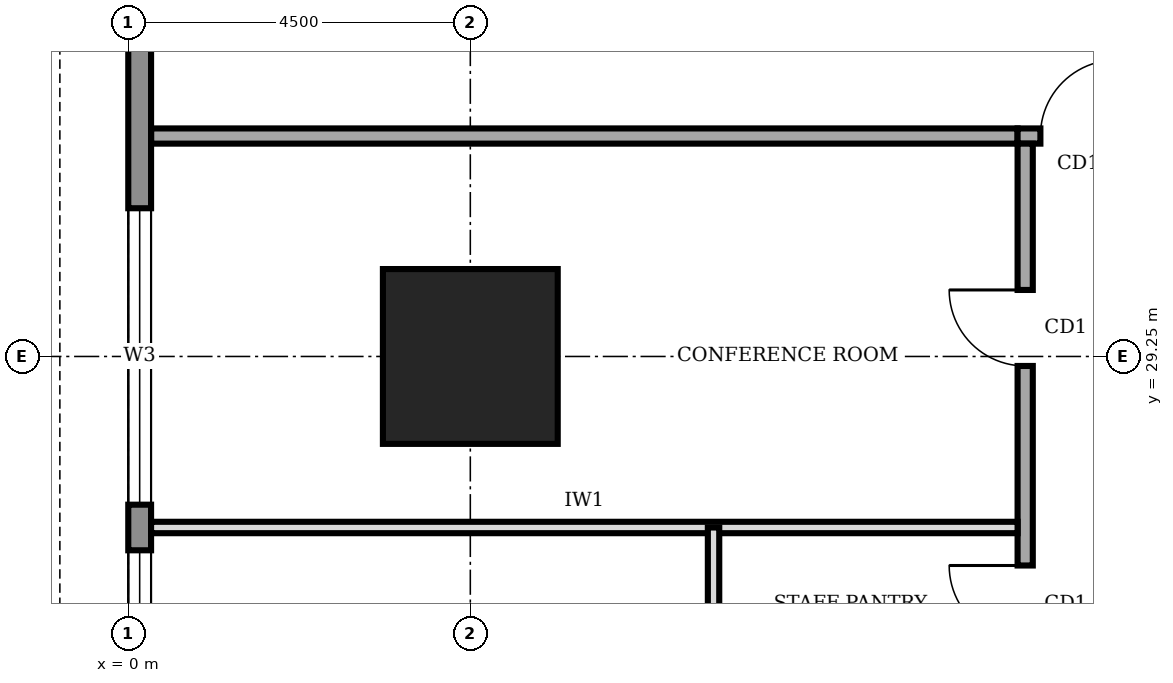
"""IFC4 building model, lengths in metres.
Left out: names, types, materials, properties, quantities, classifications, styles, units other than length and angle.
Written with IfcOpenShell. Run it as: python <this file> out.ifc"""

import sys

from ifc_helpers import new_model, si_unit, direction, frame, frame_2d, origin, origin_2d, place, context, subcontext, project, spatial, rectangle, extrude, element, fill, save


model = new_model("IFC4")
c1 = context("Model", 3, precision=1e-05, world=origin(), true_north=direction((0.0, 1.0)))
c2 = subcontext(c1, "Body", "Model", "MODEL_VIEW")
j1 = project(units=[si_unit("LENGTHUNIT", "METRE"), si_unit("PLANEANGLEUNIT", "RADIAN")], contexts=[c1])
p1 = place(None, origin())
s1 = spatial("IfcSite", under=j1, at=p1, CompositionType="ELEMENT")
p2 = place(p1, origin())
s2 = spatial("IfcBuilding", under=s1, at=p2, CompositionType="ELEMENT")
p3 = place(p2, frame((0.0, 0.0, 101.0)))
s3 = spatial("IfcBuildingStorey", under=s2, at=p3, CompositionType="ELEMENT", Elevation=101.0)
p4 = place(p3, frame((4.5, 29.25, 0.0), z_axis=(0.0, 0.0, 1.0), x_axis=(1.0, 0.0, 0.0)))
e1 = element("IfcColumn", 1, at=p4, inside=s3, PredefinedType="COLUMN", context=c2, shape_type="SweptSolid", body=[
    extrude(rectangle(XDim=2.3, YDim=2.3, at=origin_2d()), origin(), (0.0, 0.0, 1.0), 4.0),
])
p5 = place(p3, frame((0.15, 35.98, 0.0), z_axis=(0.0, 0.0, 1.0), x_axis=(0.0, -1.0, 0.0)))
e2 = element("IfcWall", 2, at=p5, inside=s3, PredefinedType="STANDARD", context=c2, shape_type="SweptSolid", body=[
    extrude(rectangle(XDim=31.46, YDim=0.3, at=frame_2d((15.73, 0.0))), origin(), (0.0, 0.0, 1.0), 3.75),
])
p6 = place(p5, frame((27.28, 0.0, 0.95)))
e3 = element("IfcOpeningElement", 3, at=p6, cuts=e2, PredefinedType="OPENING", context=c2, shape_type="SweptSolid", body=[
    extrude(rectangle(XDim=3.9, YDim=1.8, at=frame_2d((1.95, 0.9))), frame((0.0, 0.16, 0.0), z_axis=(0.0, -1.0, 0.0), x_axis=(1.0, 0.0, 0.0)), (0.0, 0.0, 1.0), 0.32),
])
p7 = place(p5, frame((22.78, 0.0, 0.95)))
e4 = element("IfcOpeningElement", 4, at=p7, cuts=e2, PredefinedType="OPENING", context=c2, shape_type="SweptSolid", body=[
    extrude(rectangle(XDim=3.9, YDim=1.8, at=frame_2d((1.95, 0.9))), frame((0.0, 0.16, 0.0), z_axis=(0.0, -1.0, 0.0), x_axis=(1.0, 0.0, 0.0)), (0.0, 0.0, 1.0), 0.32),
])
p8 = place(p5, frame((18.28, 0.0, 0.95)))
e5 = element("IfcOpeningElement", 5, at=p8, cuts=e2, PredefinedType="OPENING", context=c2, shape_type="SweptSolid", body=[
    extrude(rectangle(XDim=3.9, YDim=1.8, at=frame_2d((1.95, 0.9))), frame((0.0, 0.16, 0.0), z_axis=(0.0, -1.0, 0.0), x_axis=(1.0, 0.0, 0.0)), (0.0, 0.0, 1.0), 0.32),
])
p9 = place(p5, frame((13.78, 0.0, 0.95)))
e6 = element("IfcOpeningElement", 6, at=p9, cuts=e2, PredefinedType="OPENING", context=c2, shape_type="SweptSolid", body=[
    extrude(rectangle(XDim=3.9, YDim=1.8, at=frame_2d((1.95, 0.9))), frame((0.0, 0.16, 0.0), z_axis=(0.0, -1.0, 0.0), x_axis=(1.0, 0.0, 0.0)), (0.0, 0.0, 1.0), 0.32),
])
p10 = place(p5, frame((9.28, 0.0, 0.95)))
e7 = element("IfcOpeningElement", 7, at=p10, cuts=e2, PredefinedType="OPENING", context=c2, shape_type="SweptSolid", body=[
    extrude(rectangle(XDim=3.9, YDim=1.8, at=frame_2d((1.95, 0.9))), frame((0.0, 0.16, 0.0), z_axis=(0.0, -1.0, 0.0), x_axis=(1.0, 0.0, 0.0)), (0.0, 0.0, 1.0), 0.32),
])
p11 = place(p5, frame((4.78, 0.0, 0.95)))
e8 = element("IfcOpeningElement", 8, at=p11, cuts=e2, PredefinedType="OPENING", context=c2, shape_type="SweptSolid", body=[
    extrude(rectangle(XDim=3.9, YDim=1.8, at=frame_2d((1.95, 0.9))), frame((0.0, 0.16, 0.0), z_axis=(0.0, -1.0, 0.0), x_axis=(1.0, 0.0, 0.0)), (0.0, 0.0, 1.0), 0.32),
])
p12 = place(p3, frame((40.2, 32.15, 0.0), z_axis=(0.0, 0.0, 1.0), x_axis=(-1.0, 0.0, 0.0)))
e9 = element("IfcWall", 9, at=p12, inside=s3, PredefinedType="SOLIDWALL", context=c2, shape_type="SweptSolid", body=[
    extrude(rectangle(XDim=28.5, YDim=0.2, at=frame_2d((14.25, 0.0))), origin(), (0.0, 0.0, 1.0), 3.75),
])
p13 = place(p12, frame((27.2, 0.0, 0.0)))
e10 = element("IfcOpeningElement", 10, at=p13, cuts=e9, PredefinedType="OPENING", context=c2, shape_type="SweptSolid", body=[
    extrude(rectangle(XDim=1.0, YDim=2.1, at=frame_2d((0.5, 1.05))), frame((0.0, 0.11, 0.0), z_axis=(0.0, -1.0, 0.0), x_axis=(1.0, 0.0, 0.0)), (0.0, 0.0, 1.0), 0.22),
])
p14 = place(p12, frame((23.95, 0.0, 0.0)))
e11 = element("IfcOpeningElement", 11, at=p14, cuts=e9, PredefinedType="OPENING", context=c2, shape_type="SweptSolid", body=[
    extrude(rectangle(XDim=1.0, YDim=2.1, at=frame_2d((0.5, 1.05))), frame((0.0, 0.11, 0.0), z_axis=(0.0, -1.0, 0.0), x_axis=(1.0, 0.0, 0.0)), (0.0, 0.0, 1.0), 0.22),
])
p15 = place(p12, frame((17.2, 0.0, 0.0)))
e12 = element("IfcOpeningElement", 12, at=p15, cuts=e9, PredefinedType="OPENING", context=c2, shape_type="SweptSolid", body=[
    extrude(rectangle(XDim=1.0, YDim=2.1, at=frame_2d((0.5, 1.05))), frame((0.0, 0.11, 0.0), z_axis=(0.0, -1.0, 0.0), x_axis=(1.0, 0.0, 0.0)), (0.0, 0.0, 1.0), 0.22),
])
p16 = place(p12, frame((6.0, 0.0, 0.0)))
e13 = element("IfcOpeningElement", 13, at=p16, cuts=e9, PredefinedType="OPENING", context=c2, shape_type="SweptSolid", body=[
    extrude(rectangle(XDim=1.0, YDim=2.1, at=frame_2d((0.5, 1.05))), frame((0.0, 0.11, 0.0), z_axis=(0.0, -1.0, 0.0), x_axis=(1.0, 0.0, 0.0)), (0.0, 0.0, 1.0), 0.22),
])
p17 = place(p3, frame((11.8, 32.05, 0.0), z_axis=(0.0, 0.0, 1.0), x_axis=(0.0, -1.0, 0.0)))
e14 = element("IfcWall", 14, at=p17, inside=s3, PredefinedType="SOLIDWALL", context=c2, shape_type="SweptSolid", body=[
    extrude(rectangle(XDim=23.8, YDim=0.2, at=frame_2d((11.9, 0.0))), origin(), (0.0, 0.0, 1.0), 3.75),
])
p18 = place(p17, frame((20.675, 0.0, 0.0)))
e15 = element("IfcOpeningElement", 15, at=p18, cuts=e14, PredefinedType="OPENING", context=c2, shape_type="SweptSolid", body=[
    extrude(rectangle(XDim=1.0, YDim=2.1, at=frame_2d((0.5, 1.05))), frame((0.0, 0.11, 0.0), z_axis=(0.0, -1.0, 0.0), x_axis=(1.0, 0.0, 0.0)), (0.0, 0.0, 1.0), 0.22),
])
p19 = place(p17, frame((16.2, 0.0, 0.0)))
e16 = element("IfcOpeningElement", 16, at=p19, cuts=e14, PredefinedType="OPENING", context=c2, shape_type="SweptSolid", body=[
    extrude(rectangle(XDim=0.9, YDim=2.1, at=frame_2d((0.45, 1.05))), frame((0.0, 0.11, 0.0), z_axis=(0.0, -1.0, 0.0), x_axis=(1.0, 0.0, 0.0)), (0.0, 0.0, 1.0), 0.22),
])
p20 = place(p17, frame((13.2, 0.0, 0.0)))
e17 = element("IfcOpeningElement", 17, at=p20, cuts=e14, PredefinedType="OPENING", context=c2, shape_type="SweptSolid", body=[
    extrude(rectangle(XDim=0.9, YDim=2.1, at=frame_2d((0.45, 1.05))), frame((0.0, 0.11, 0.0), z_axis=(0.0, -1.0, 0.0), x_axis=(1.0, 0.0, 0.0)), (0.0, 0.0, 1.0), 0.22),
])
p21 = place(p17, frame((8.35, 0.0, 0.0)))
e18 = element("IfcOpeningElement", 18, at=p21, cuts=e14, PredefinedType="OPENING", context=c2, shape_type="SweptSolid", body=[
    extrude(rectangle(XDim=0.9, YDim=2.1, at=frame_2d((0.45, 1.05))), frame((0.0, 0.11, 0.0), z_axis=(0.0, -1.0, 0.0), x_axis=(1.0, 0.0, 0.0)), (0.0, 0.0, 1.0), 0.22),
])
p22 = place(p17, frame((5.55, 0.0, 0.0)))
e19 = element("IfcOpeningElement", 19, at=p22, cuts=e14, PredefinedType="OPENING", context=c2, shape_type="SweptSolid", body=[
    extrude(rectangle(XDim=1.0, YDim=2.1, at=frame_2d((0.5, 1.05))), frame((0.0, 0.11, 0.0), z_axis=(0.0, -1.0, 0.0), x_axis=(1.0, 0.0, 0.0)), (0.0, 0.0, 1.0), 0.22),
])
p23 = place(p17, frame((11.05, 0.0, 0.0)))
e20 = element("IfcOpeningElement", 20, at=p23, cuts=e14, PredefinedType="OPENING", context=c2, shape_type="SweptSolid", body=[
    extrude(rectangle(XDim=1.0, YDim=2.1, at=frame_2d((0.5, 1.05))), frame((0.0, 0.11, 0.0), z_axis=(0.0, -1.0, 0.0), x_axis=(1.0, 0.0, 0.0)), (0.0, 0.0, 1.0), 0.22),
])
p24 = place(p17, frame((1.925, 0.0, 0.0)))
e21 = element("IfcOpeningElement", 21, at=p24, cuts=e14, PredefinedType="OPENING", context=c2, shape_type="SweptSolid", body=[
    extrude(rectangle(XDim=1.0, YDim=2.1, at=frame_2d((0.5, 1.05))), frame((0.0, 0.11, 0.0), z_axis=(0.0, -1.0, 0.0), x_axis=(1.0, 0.0, 0.0)), (0.0, 0.0, 1.0), 0.22),
])
p25 = place(p3, frame((0.3, 32.15, 0.0), z_axis=(0.0, 0.0, 1.0), x_axis=(1.0, 0.0, 0.0)))
e22 = element("IfcWall", 22, at=p25, inside=s3, PredefinedType="SOLIDWALL", context=c2, shape_type="SweptSolid", body=[
    extrude(rectangle(XDim=11.4, YDim=0.2, at=frame_2d((5.7, 0.0))), origin(), (0.0, 0.0, 1.0), 3.75),
])
p26 = place(p3, frame((0.3, 27.0, 0.0), z_axis=(0.0, 0.0, 1.0), x_axis=(1.0, 0.0, 0.0)))
e23 = element("IfcWall", 23, at=p26, inside=s3, PredefinedType="PARTITIONING", context=c2, shape_type="SweptSolid", body=[
    extrude(rectangle(XDim=11.4, YDim=0.15, at=frame_2d((5.7, 0.0))), origin(), (0.0, 0.0, 1.0), 3.75),
])
p27 = place(p3, frame((7.7, 25.0, 0.0), z_axis=(0.0, 0.0, 1.0), x_axis=(0.0, 1.0, 0.0)))
e24 = element("IfcWall", 24, at=p27, inside=s3, PredefinedType="PARTITIONING", context=c2, shape_type="SweptSolid", body=[
    extrude(rectangle(XDim=2.0, YDim=0.15, at=frame_2d((1.0, 0.0))), origin(), (0.0, 0.0, 1.0), 3.75),
])
p28 = place(p10, origin())
e25 = element("IfcWindow", 25, at=p28, inside=s3, PartitioningType="SINGLE_PANEL", PredefinedType="WINDOW", context=c2, shape_type="SweptSolid", body=[
    extrude(rectangle(XDim=3.9, YDim=1.8, at=frame_2d((1.95, 0.9))), frame((0.0, 0.03, 0.0), z_axis=(0.0, -1.0, 0.0), x_axis=(1.0, 0.0, 0.0)), (0.0, 0.0, 1.0), 0.06),
])
fill(e7, e25)
p29 = place(p11, origin())
e26 = element("IfcWindow", 26, at=p29, inside=s3, PartitioningType="SINGLE_PANEL", PredefinedType="WINDOW", context=c2, shape_type="SweptSolid", body=[
    extrude(rectangle(XDim=3.9, YDim=1.8, at=frame_2d((1.95, 0.9))), frame((0.0, 0.03, 0.0), z_axis=(0.0, -1.0, 0.0), x_axis=(1.0, 0.0, 0.0)), (0.0, 0.0, 1.0), 0.06),
])
fill(e8, e26)
p30 = place(p13, frame((1.0, 0.0, 0.0), z_axis=(0.0, 0.0, 1.0), x_axis=(-1.0, 0.0, 0.0)))
e27 = element("IfcDoor", 27, at=p30, inside=s3, OperationType="SINGLE_SWING_RIGHT", PredefinedType="DOOR", context=c2, shape_type="SweptSolid", body=[
    extrude(rectangle(XDim=1.0, YDim=2.1, at=frame_2d((0.5, 1.05))), frame((0.0, 0.025, 0.0), z_axis=(0.0, -1.0, 0.0), x_axis=(1.0, 0.0, 0.0)), (0.0, 0.0, 1.0), 0.05),
])
fill(e10, e27)
p31 = place(p22, frame((1.0, 0.0, 0.0), z_axis=(0.0, 0.0, 1.0), x_axis=(-1.0, 0.0, 0.0)))
e28 = element("IfcDoor", 28, at=p31, inside=s3, OperationType="SINGLE_SWING_RIGHT", PredefinedType="DOOR", context=c2, shape_type="SweptSolid", body=[
    extrude(rectangle(XDim=1.0, YDim=2.1, at=frame_2d((0.5, 1.05))), frame((0.0, 0.025, 0.0), z_axis=(0.0, -1.0, 0.0), x_axis=(1.0, 0.0, 0.0)), (0.0, 0.0, 1.0), 0.05),
])
fill(e19, e28)
p32 = place(p24, frame((1.0, 0.0, 0.0), z_axis=(0.0, 0.0, 1.0), x_axis=(-1.0, 0.0, 0.0)))
e29 = element("IfcDoor", 29, at=p32, inside=s3, OperationType="SINGLE_SWING_RIGHT", PredefinedType="DOOR", context=c2, shape_type="SweptSolid", body=[
    extrude(rectangle(XDim=1.0, YDim=2.1, at=frame_2d((0.5, 1.05))), frame((0.0, 0.025, 0.0), z_axis=(0.0, -1.0, 0.0), x_axis=(1.0, 0.0, 0.0)), (0.0, 0.0, 1.0), 0.05),
])
fill(e21, e29)
save(model, sys.argv[1])
